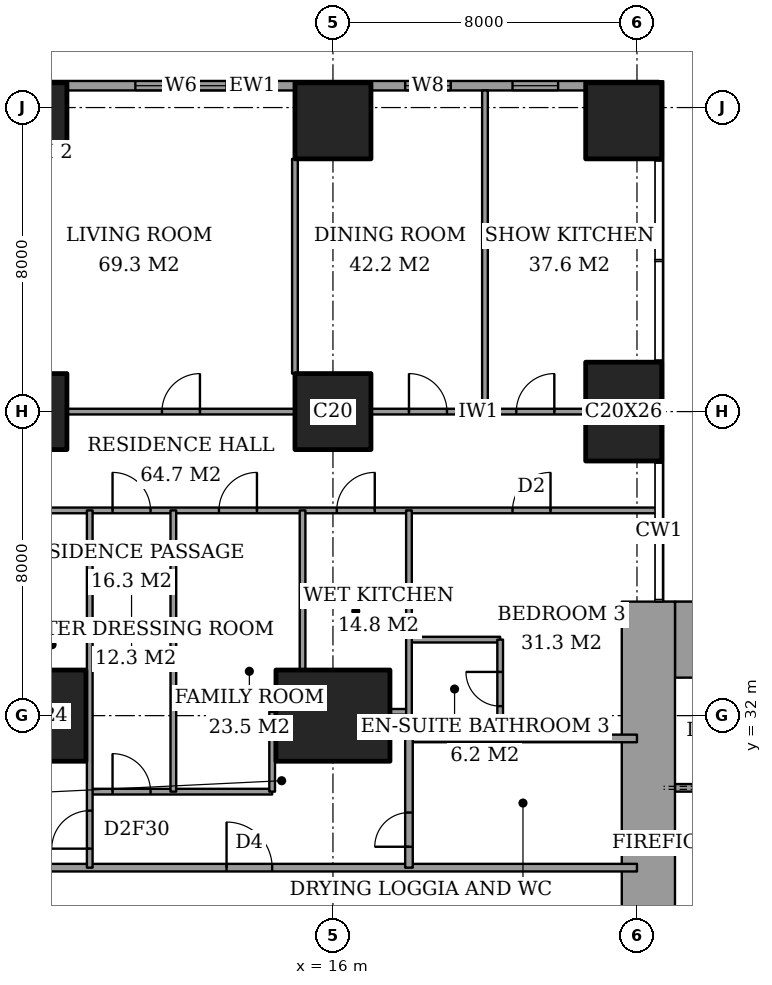
"""IFC4 building model, lengths in metres.
Left out: names, types, materials, properties, quantities, classifications, styles, units other than length and angle.
Written with IfcOpenShell. Run it as: python <this file> out.ifc"""

import sys

from ifc_helpers import new_model, si_unit, direction, frame, frame_2d, origin, origin_2d, place, context, subcontext, project, spatial, rectangle, extrude, element, fill, save


model = new_model("IFC4")
c1 = context("Model", 3, precision=1e-05, world=origin(), true_north=direction((0.0, 1.0)))
c2 = subcontext(c1, "Body", "Model", "MODEL_VIEW")
j1 = project(units=[si_unit("LENGTHUNIT", "METRE"), si_unit("PLANEANGLEUNIT", "RADIAN")], contexts=[c1])
p1 = place(None, origin())
s1 = spatial("IfcSite", under=j1, at=p1, CompositionType="ELEMENT")
p2 = place(p1, origin())
s2 = spatial("IfcBuilding", under=s1, at=p2, CompositionType="ELEMENT")
p3 = place(p2, frame((0.0, 0.0, 72.8)))
s3 = spatial("IfcBuildingStorey", under=s2, at=p3, CompositionType="ELEMENT", Elevation=72.8)
p4 = place(p3, frame((8.0, 32.0, 0.0), z_axis=(0.0, 0.0, 1.0), x_axis=(1.0, 0.0, 0.0)))
e1 = element("IfcColumn", 1, at=p4, inside=s3, PredefinedType="COLUMN", context=c2, shape_type="SweptSolid", body=[
    extrude(rectangle(XDim=3.0, YDim=2.4, at=origin_2d()), origin(), (0.0, 0.0, 1.0), 3.6),
])
for number, where, z_axis, x_axis in (
    (2, (8.0, 40.0, 0.0), (0.0, 0.0, 1.0), (1.0, 0.0, 0.0)),
    (3, (8.0, 47.65, 0.0), (0.0, 0.0, 1.0), (1.0, 0.0, 0.0)),
):
    element("IfcColumn", number, at=place(p3, frame(where, z_axis=z_axis, x_axis=x_axis)), inside=s3, PredefinedType="COLUMN", context=c2, shape_type="SweptSolid", body=[
        extrude(rectangle(XDim=2.0, YDim=2.0, at=origin_2d()), origin(), (0.0, 0.0, 1.0), 3.6),
    ])
p5 = place(p3, frame((16.0, 32.0, 0.0), z_axis=(0.0, 0.0, 1.0), x_axis=(1.0, 0.0, 0.0)))
e4 = element("IfcColumn", 4, at=p5, inside=s3, PredefinedType="COLUMN", context=c2, shape_type="SweptSolid", body=[
    extrude(rectangle(XDim=3.0, YDim=2.4, at=origin_2d()), origin(), (0.0, 0.0, 1.0), 3.6),
])
for number, where, z_axis, x_axis in (
    (5, (16.0, 40.0, 0.0), (0.0, 0.0, 1.0), (1.0, 0.0, 0.0)),
    (6, (16.0, 47.65, 0.0), (0.0, 0.0, 1.0), (1.0, 0.0, 0.0)),
):
    element("IfcColumn", number, at=place(p3, frame(where, z_axis=z_axis, x_axis=x_axis)), inside=s3, PredefinedType="COLUMN", context=c2, shape_type="SweptSolid", body=[
        extrude(rectangle(XDim=2.0, YDim=2.0, at=origin_2d()), origin(), (0.0, 0.0, 1.0), 3.6),
    ])
p6 = place(p3, frame((23.65, 40.0, 0.0), z_axis=(0.0, 0.0, 1.0), x_axis=(1.0, 0.0, 0.0)))
e7 = element("IfcColumn", 7, at=p6, inside=s3, PredefinedType="COLUMN", context=c2, shape_type="SweptSolid", body=[
    extrude(rectangle(XDim=2.0, YDim=2.6, at=origin_2d()), origin(), (0.0, 0.0, 1.0), 3.6),
])
p7 = place(p3, frame((23.65, 47.65, 0.0), z_axis=(0.0, 0.0, 1.0), x_axis=(1.0, 0.0, 0.0)))
e8 = element("IfcColumn", 8, at=p7, inside=s3, PredefinedType="COLUMN", context=c2, shape_type="SweptSolid", body=[
    extrude(rectangle(XDim=2.0, YDim=2.0, at=origin_2d()), origin(), (0.0, 0.0, 1.0), 3.6),
])
p8 = place(p3, frame((25.0, 34.0, 0.0), z_axis=(0.0, 0.0, 1.0), x_axis=(1.0, 0.0, 0.0)))
e9 = element("IfcWall", 9, at=p8, inside=s3, PredefinedType="SHEAR", context=c2, shape_type="SweptSolid", body=[
    extrude(rectangle(XDim=3.15, YDim=2.0, at=frame_2d((1.575, 0.0))), origin(), (0.0, 0.0, 1.0), 3.6),
])
p9 = place(p3, frame((24.3, 23.15, 0.0), z_axis=(0.0, 0.0, 1.0), x_axis=(0.0, 1.0, 0.0)))
e10 = element("IfcWall", 10, at=p9, inside=s3, PredefinedType="SHEAR", context=c2, shape_type="SweptSolid", body=[
    extrude(rectangle(XDim=11.85, YDim=1.4, at=frame_2d((5.925, 0.0))), origin(), (0.0, 0.0, 1.0), 3.6),
])
p10 = place(p9, frame((0.75, 0.0, 0.0)))
e11 = element("IfcOpeningElement", 11, at=p10, cuts=e10, PredefinedType="OPENING", context=c2, shape_type="SweptSolid", body=[
    extrude(rectangle(XDim=1.8, YDim=2.4, at=frame_2d((0.9, 1.2))), frame((0.0, 0.71, 0.0), z_axis=(0.0, -1.0, 0.0), x_axis=(1.0, 0.0, 0.0)), (0.0, 0.0, 1.0), 1.42),
])
p11 = place(p3, frame((24.575, 48.575, 0.0), z_axis=(0.0, 0.0, 1.0), x_axis=(-1.0, 0.0, 0.0)))
e12 = element("IfcWall", 12, at=p11, inside=s3, PredefinedType="SOLIDWALL", context=c2, shape_type="SweptSolid", body=[
    extrude(rectangle(XDim=21.4, YDim=0.25, at=frame_2d((10.7, 0.0))), origin(), (0.0, 0.0, 1.0), 3.6),
])
p12 = place(p11, frame((2.65, 0.0, 0.6)))
e13 = element("IfcOpeningElement", 13, at=p12, cuts=e12, PredefinedType="OPENING", context=c2, shape_type="SweptSolid", body=[
    extrude(rectangle(XDim=1.2, YDim=2.0, at=frame_2d((0.6, 1.0))), frame((0.0, 0.135, 0.0), z_axis=(0.0, -1.0, 0.0), x_axis=(1.0, 0.0, 0.0)), (0.0, 0.0, 1.0), 0.27),
])
p13 = place(p11, frame((5.475, 0.0, 0.6)))
e14 = element("IfcOpeningElement", 14, at=p13, cuts=e12, PredefinedType="OPENING", context=c2, shape_type="SweptSolid", body=[
    extrude(rectangle(XDim=1.2, YDim=2.0, at=frame_2d((0.6, 1.0))), frame((0.0, 0.135, 0.0), z_axis=(0.0, -1.0, 0.0), x_axis=(1.0, 0.0, 0.0)), (0.0, 0.0, 1.0), 0.27),
])
p14 = place(p11, frame((11.375, 0.0, 0.6)))
e15 = element("IfcOpeningElement", 15, at=p14, cuts=e12, PredefinedType="OPENING", context=c2, shape_type="SweptSolid", body=[
    extrude(rectangle(XDim=2.4, YDim=2.0, at=frame_2d((1.2, 1.0))), frame((0.0, 0.135, 0.0), z_axis=(0.0, -1.0, 0.0), x_axis=(1.0, 0.0, 0.0)), (0.0, 0.0, 1.0), 0.27),
])
p15 = place(p11, frame((18.1, 0.0, 0.6)))
e16 = element("IfcOpeningElement", 16, at=p15, cuts=e12, PredefinedType="OPENING", context=c2, shape_type="SweptSolid", body=[
    extrude(rectangle(XDim=1.2, YDim=2.0, at=frame_2d((0.6, 1.0))), frame((0.0, 0.135, 0.0), z_axis=(0.0, -1.0, 0.0), x_axis=(1.0, 0.0, 0.0)), (0.0, 0.0, 1.0), 0.27),
])
p16 = place(p11, frame((19.925, 0.0, 0.6)))
e17 = element("IfcOpeningElement", 17, at=p16, cuts=e12, PredefinedType="OPENING", context=c2, shape_type="SweptSolid", body=[
    extrude(rectangle(XDim=1.2, YDim=2.0, at=frame_2d((0.6, 1.0))), frame((0.0, 0.135, 0.0), z_axis=(0.0, -1.0, 0.0), x_axis=(1.0, 0.0, 0.0)), (0.0, 0.0, 1.0), 0.27),
])
p17 = place(p3, frame((6.725, 28.0, 0.0), z_axis=(0.0, 0.0, 1.0), x_axis=(1.0, 0.0, 0.0)))
e18 = element("IfcWall", 18, at=p17, inside=s3, PredefinedType="PARTITIONING", context=c2, shape_type="SweptSolid", body=[
    extrude(rectangle(XDim=17.275, YDim=0.2, at=frame_2d((8.637, 0.0))), origin(), (0.0, 0.0, 1.0), 3.35),
])
p18 = place(p17, frame((6.475, 0.0, 0.0)))
e19 = element("IfcOpeningElement", 19, at=p18, cuts=e18, PredefinedType="OPENING", context=c2, shape_type="SweptSolid", body=[
    extrude(rectangle(XDim=1.2, YDim=2.4, at=frame_2d((0.6, 1.2))), frame((0.0, 0.11, 0.0), z_axis=(0.0, -1.0, 0.0), x_axis=(1.0, 0.0, 0.0)), (0.0, 0.0, 1.0), 0.22),
])
p19 = place(p3, frame((9.6, 30.0, 0.0), z_axis=(0.0, 0.0, 1.0), x_axis=(1.0, 0.0, 0.0)))
e20 = element("IfcWall", 20, at=p19, inside=s3, PredefinedType="PARTITIONING", context=c2, shape_type="SweptSolid", body=[
    extrude(rectangle(XDim=4.8, YDim=0.15, at=frame_2d((2.4, 0.0))), origin(), (0.0, 0.0, 1.0), 3.35),
])
p20 = place(p19, frame((0.6, 0.0, 0.0)))
e21 = element("IfcOpeningElement", 21, at=p20, cuts=e20, PredefinedType="OPENING", context=c2, shape_type="SweptSolid", body=[
    extrude(rectangle(XDim=1.0, YDim=2.1, at=frame_2d((0.5, 1.05))), frame((0.0, 0.085, 0.0), z_axis=(0.0, -1.0, 0.0), x_axis=(1.0, 0.0, 0.0)), (0.0, 0.0, 1.0), 0.17),
])
p21 = place(p3, frame((18.0, 31.4, 0.0), z_axis=(0.0, 0.0, 1.0), x_axis=(1.0, 0.0, 0.0)))
e22 = element("IfcWall", 22, at=p21, inside=s3, PredefinedType="PARTITIONING", context=c2, shape_type="SweptSolid", body=[
    extrude(rectangle(XDim=6.0, YDim=0.2, at=frame_2d((3.0, 0.0))), origin(), (0.0, 0.0, 1.0), 3.35),
])
p22 = place(p3, frame((17.5, 32.1, 0.0), z_axis=(0.0, 0.0, 1.0), x_axis=(1.0, 0.0, 0.0)))
e23 = element("IfcWall", 23, at=p22, inside=s3, PredefinedType="PARTITIONING", context=c2, shape_type="SweptSolid", body=[
    extrude(rectangle(XDim=0.5, YDim=0.15, at=frame_2d((0.25, 0.0))), origin(), (0.0, 0.0, 1.0), 2.634),
])
p23 = place(p3, frame((18.0, 34.0, 0.0), z_axis=(0.0, 0.0, 1.0), x_axis=(1.0, 0.0, 0.0)))
e24 = element("IfcWall", 24, at=p23, inside=s3, PredefinedType="PARTITIONING", context=c2, shape_type="SweptSolid", body=[
    extrude(rectangle(XDim=2.4, YDim=0.15, at=frame_2d((1.2, 0.0))), origin(), (0.0, 0.0, 1.0), 3.35),
])
p24 = place(p3, frame((-0.45, 37.4, 0.0), z_axis=(0.0, 0.0, 1.0), x_axis=(1.0, 0.0, 0.0)))
e25 = element("IfcWall", 25, at=p24, inside=s3, PredefinedType="PARTITIONING", context=c2, shape_type="SweptSolid", body=[
    extrude(rectangle(XDim=25.011, YDim=0.15, at=frame_2d((12.505, 0.0))), origin(), (0.0, 0.0, 1.0), 3.35),
])
p25 = place(p24, frame((10.65, 0.0, 0.0)))
e26 = element("IfcOpeningElement", 26, at=p25, cuts=e25, PredefinedType="OPENING", context=c2, shape_type="SweptSolid", body=[
    extrude(rectangle(XDim=1.0, YDim=2.1, at=frame_2d((0.5, 1.05))), frame((0.0, 0.085, 0.0), z_axis=(0.0, -1.0, 0.0), x_axis=(1.0, 0.0, 0.0)), (0.0, 0.0, 1.0), 0.17),
])
p26 = place(p24, frame((3.087, 0.0, 0.0)))
e27 = element("IfcOpeningElement", 27, at=p26, cuts=e25, PredefinedType="OPENING", context=c2, shape_type="SweptSolid", body=[
    extrude(rectangle(XDim=1.0, YDim=2.1, at=frame_2d((0.5, 1.05))), frame((0.0, 0.085, 0.0), z_axis=(0.0, -1.0, 0.0), x_axis=(1.0, 0.0, 0.0)), (0.0, 0.0, 1.0), 0.17),
])
p27 = place(p24, frame((13.45, 0.0, 0.0)))
e28 = element("IfcOpeningElement", 28, at=p27, cuts=e25, PredefinedType="OPENING", context=c2, shape_type="SweptSolid", body=[
    extrude(rectangle(XDim=1.0, YDim=2.1, at=frame_2d((0.5, 1.05))), frame((0.0, 0.085, 0.0), z_axis=(0.0, -1.0, 0.0), x_axis=(1.0, 0.0, 0.0)), (0.0, 0.0, 1.0), 0.17),
])
p28 = place(p24, frame((16.55, 0.0, 0.0)))
e29 = element("IfcOpeningElement", 29, at=p28, cuts=e25, PredefinedType="OPENING", context=c2, shape_type="SweptSolid", body=[
    extrude(rectangle(XDim=1.0, YDim=2.1, at=frame_2d((0.5, 1.05))), frame((0.0, 0.085, 0.0), z_axis=(0.0, -1.0, 0.0), x_axis=(1.0, 0.0, 0.0)), (0.0, 0.0, 1.0), 0.17),
])
p29 = place(p24, frame((21.175, 0.0, 0.0)))
e30 = element("IfcOpeningElement", 30, at=p29, cuts=e25, PredefinedType="OPENING", context=c2, shape_type="SweptSolid", body=[
    extrude(rectangle(XDim=1.0, YDim=2.1, at=frame_2d((0.5, 1.05))), frame((0.0, 0.085, 0.0), z_axis=(0.0, -1.0, 0.0), x_axis=(1.0, 0.0, 0.0)), (0.0, 0.0, 1.0), 0.17),
])
p30 = place(p3, frame((9.0, 40.0, 0.0), z_axis=(0.0, 0.0, 1.0), x_axis=(1.0, 0.0, 0.0)))
e31 = element("IfcWall", 31, at=p30, inside=s3, PredefinedType="PARTITIONING", context=c2, shape_type="SweptSolid", body=[
    extrude(rectangle(XDim=6.0, YDim=0.15, at=frame_2d((3.0, 0.0))), origin(), (0.0, 0.0, 1.0), 3.35),
])
p31 = place(p30, frame((2.5, 0.0, 0.0)))
e32 = element("IfcOpeningElement", 32, at=p31, cuts=e31, PredefinedType="OPENING", context=c2, shape_type="SweptSolid", body=[
    extrude(rectangle(XDim=1.0, YDim=2.1, at=frame_2d((0.5, 1.05))), frame((0.0, 0.085, 0.0), z_axis=(0.0, -1.0, 0.0), x_axis=(1.0, 0.0, 0.0)), (0.0, 0.0, 1.0), 0.17),
])
p32 = place(p3, frame((17.0, 40.0, 0.0), z_axis=(0.0, 0.0, 1.0), x_axis=(1.0, 0.0, 0.0)))
e33 = element("IfcWall", 33, at=p32, inside=s3, PredefinedType="PARTITIONING", context=c2, shape_type="SweptSolid", body=[
    extrude(rectangle(XDim=5.65, YDim=0.15, at=frame_2d((2.825, 0.0))), origin(), (0.0, 0.0, 1.0), 3.35),
])
p33 = place(p32, frame((1.0, 0.0, 0.0)))
e34 = element("IfcOpeningElement", 34, at=p33, cuts=e33, PredefinedType="OPENING", context=c2, shape_type="SweptSolid", body=[
    extrude(rectangle(XDim=1.0, YDim=2.1, at=frame_2d((0.5, 1.05))), frame((0.0, 0.085, 0.0), z_axis=(0.0, -1.0, 0.0), x_axis=(1.0, 0.0, 0.0)), (0.0, 0.0, 1.0), 0.17),
])
p34 = place(p32, frame((3.825, 0.0, 0.0)))
e35 = element("IfcOpeningElement", 35, at=p34, cuts=e33, PredefinedType="OPENING", context=c2, shape_type="SweptSolid", body=[
    extrude(rectangle(XDim=1.0, YDim=2.1, at=frame_2d((0.5, 1.05))), frame((0.0, 0.085, 0.0), z_axis=(0.0, -1.0, 0.0), x_axis=(1.0, 0.0, 0.0)), (0.0, 0.0, 1.0), 0.17),
])
p35 = place(p3, frame((9.6, 28.0, 0.0), z_axis=(0.0, 0.0, 1.0), x_axis=(0.0, 1.0, 0.0)))
e36 = element("IfcWall", 36, at=p35, inside=s3, PredefinedType="PARTITIONING", context=c2, shape_type="SweptSolid", body=[
    extrude(rectangle(XDim=9.4, YDim=0.15, at=frame_2d((4.7, 0.0))), origin(), (0.0, 0.0, 1.0), 3.35),
])
p36 = place(p35, frame((0.5, 0.0, 0.0)))
e37 = element("IfcOpeningElement", 37, at=p36, cuts=e36, PredefinedType="OPENING", context=c2, shape_type="SweptSolid", body=[
    extrude(rectangle(XDim=1.0, YDim=2.1, at=frame_2d((0.5, 1.05))), frame((0.0, 0.085, 0.0), z_axis=(0.0, -1.0, 0.0), x_axis=(1.0, 0.0, 0.0)), (0.0, 0.0, 1.0), 0.17),
])
p37 = place(p3, frame((11.8, 30.0, 0.0), z_axis=(0.0, 0.0, 1.0), x_axis=(0.0, 1.0, 0.0)))
e38 = element("IfcWall", 38, at=p37, inside=s3, PredefinedType="PARTITIONING", context=c2, shape_type="SweptSolid", body=[
    extrude(rectangle(XDim=7.4, YDim=0.15, at=frame_2d((3.7, 0.0))), origin(), (0.0, 0.0, 1.0), 3.35),
])
p38 = place(p3, frame((14.4, 30.0, 0.0), z_axis=(0.0, 0.0, 1.0), x_axis=(0.0, 1.0, 0.0)))
e39 = element("IfcWall", 39, at=p38, inside=s3, PredefinedType="PARTITIONING", context=c2, shape_type="SweptSolid", body=[
    extrude(rectangle(XDim=2.1, YDim=0.15, at=frame_2d((1.05, 0.0))), origin(), (0.0, 0.0, 1.0), 3.35),
])
p39 = place(p3, frame((15.0, 41.0, 0.0), z_axis=(0.0, 0.0, 1.0), x_axis=(0.0, 1.0, 0.0)))
e40 = element("IfcWall", 40, at=p39, inside=s3, PredefinedType="PARTITIONING", context=c2, shape_type="SweptSolid", body=[
    extrude(rectangle(XDim=5.65, YDim=0.15, at=frame_2d((2.825, 0.0))), origin(), (0.0, 0.0, 1.0), 3.35),
])
p40 = place(p3, frame((15.2, 33.2, 0.0), z_axis=(0.0, 0.0, 1.0), x_axis=(0.0, 1.0, 0.0)))
e41 = element("IfcWall", 41, at=p40, inside=s3, PredefinedType="PARTITIONING", context=c2, shape_type="SweptSolid", body=[
    extrude(rectangle(XDim=4.2, YDim=0.15, at=frame_2d((2.1, 0.0))), origin(), (0.0, 0.0, 1.0), 3.35),
])
p41 = place(p3, frame((18.0, 28.0, 0.0), z_axis=(0.0, 0.0, 1.0), x_axis=(0.0, 1.0, 0.0)))
e42 = element("IfcWall", 42, at=p41, inside=s3, PredefinedType="PARTITIONING", context=c2, shape_type="SweptSolid", body=[
    extrude(rectangle(XDim=3.4, YDim=0.2, at=frame_2d((1.7, 0.0))), origin(), (0.0, 0.0, 1.0), 3.35),
])
p42 = place(p41, frame((0.55, 0.0, 0.0)))
e43 = element("IfcOpeningElement", 43, at=p42, cuts=e42, PredefinedType="OPENING", context=c2, shape_type="SweptSolid", body=[
    extrude(rectangle(XDim=0.9, YDim=2.1, at=frame_2d((0.45, 1.05))), frame((0.0, 0.11, 0.0), z_axis=(0.0, -1.0, 0.0), x_axis=(1.0, 0.0, 0.0)), (0.0, 0.0, 1.0), 0.22),
])
p43 = place(p3, frame((18.0, 31.4, 0.0), z_axis=(0.0, 0.0, 1.0), x_axis=(0.0, 1.0, 0.0)))
e44 = element("IfcWall", 44, at=p43, inside=s3, PredefinedType="PARTITIONING", context=c2, shape_type="SweptSolid", body=[
    extrude(rectangle(XDim=6.0, YDim=0.15, at=frame_2d((3.0, 0.0))), origin(), (0.0, 0.0, 1.0), 3.35),
])
p44 = place(p3, frame((20.0, 40.0, 0.0), z_axis=(0.0, 0.0, 1.0), x_axis=(0.0, 1.0, 0.0)))
e45 = element("IfcWall", 45, at=p44, inside=s3, PredefinedType="PARTITIONING", context=c2, shape_type="SweptSolid", body=[
    extrude(rectangle(XDim=8.45, YDim=0.15, at=frame_2d((4.225, 0.0))), origin(), (0.0, 0.0, 1.0), 3.35),
])
p45 = place(p3, frame((20.4, 31.4, 0.0), z_axis=(0.0, 0.0, 1.0), x_axis=(0.0, 1.0, 0.0)))
e46 = element("IfcWall", 46, at=p45, inside=s3, PredefinedType="PARTITIONING", context=c2, shape_type="SweptSolid", body=[
    extrude(rectangle(XDim=2.6, YDim=0.15, at=frame_2d((1.3, 0.0))), origin(), (0.0, 0.0, 1.0), 3.35),
])
p46 = place(p45, frame((0.85, 0.0, 0.0)))
e47 = element("IfcOpeningElement", 47, at=p46, cuts=e46, PredefinedType="OPENING", context=c2, shape_type="SweptSolid", body=[
    extrude(rectangle(XDim=0.9, YDim=2.1, at=frame_2d((0.45, 1.05))), frame((0.0, 0.085, 0.0), z_axis=(0.0, -1.0, 0.0), x_axis=(1.0, 0.0, 0.0)), (0.0, 0.0, 1.0), 0.17),
])
p47 = place(p3, frame((25.0, 30.1, 0.0), z_axis=(0.0, 0.0, 1.0), x_axis=(1.0, 0.0, 0.0)))
e48 = element("IfcWall", 48, at=p47, inside=s3, PredefinedType="PARTITIONING", context=c2, shape_type="SweptSolid", body=[
    extrude(rectangle(XDim=12.7, YDim=0.2, at=frame_2d((6.35, 0.0))), origin(), (0.0, 0.0, 1.0), 3.6),
])
p48 = place(p47, frame((0.9, 0.0, 0.0)))
e49 = element("IfcOpeningElement", 49, at=p48, cuts=e48, PredefinedType="OPENING", context=c2, shape_type="SweptSolid", body=[
    extrude(rectangle(XDim=1.2, YDim=2.1, at=frame_2d((0.6, 1.05))), frame((0.0, 0.11, 0.0), z_axis=(0.0, -1.0, 0.0), x_axis=(1.0, 0.0, 0.0)), (0.0, 0.0, 1.0), 0.22),
])
p49 = place(p12, origin())
e50 = element("IfcWindow", 50, at=p49, inside=s3, PartitioningType="SINGLE_PANEL", PredefinedType="WINDOW", context=c2, shape_type="SweptSolid", body=[
    extrude(rectangle(XDim=1.2, YDim=2.0, at=frame_2d((0.6, 1.0))), frame((0.0, 0.03, 0.0), z_axis=(0.0, -1.0, 0.0), x_axis=(1.0, 0.0, 0.0)), (0.0, 0.0, 1.0), 0.06),
])
fill(e13, e50)
p50 = place(p13, origin())
e51 = element("IfcWindow", 51, at=p50, inside=s3, PartitioningType="SINGLE_PANEL", PredefinedType="WINDOW", context=c2, shape_type="SweptSolid", body=[
    extrude(rectangle(XDim=1.2, YDim=2.0, at=frame_2d((0.6, 1.0))), frame((0.0, 0.03, 0.0), z_axis=(0.0, -1.0, 0.0), x_axis=(1.0, 0.0, 0.0)), (0.0, 0.0, 1.0), 0.06),
])
fill(e14, e51)
p51 = place(p14, origin())
e52 = element("IfcWindow", 52, at=p51, inside=s3, PartitioningType="SINGLE_PANEL", PredefinedType="WINDOW", context=c2, shape_type="SweptSolid", body=[
    extrude(rectangle(XDim=2.4, YDim=2.0, at=frame_2d((1.2, 1.0))), frame((0.0, 0.03, 0.0), z_axis=(0.0, -1.0, 0.0), x_axis=(1.0, 0.0, 0.0)), (0.0, 0.0, 1.0), 0.06),
])
fill(e15, e52)
p52 = place(p31, origin())
e53 = element("IfcDoor", 53, at=p52, inside=s3, OperationType="SINGLE_SWING_LEFT", PredefinedType="DOOR", context=c2, shape_type="SweptSolid", body=[
    extrude(rectangle(XDim=1.0, YDim=2.1, at=frame_2d((0.5, 1.05))), frame((0.0, 0.025, 0.0), z_axis=(0.0, -1.0, 0.0), x_axis=(1.0, 0.0, 0.0)), (0.0, 0.0, 1.0), 0.05),
])
fill(e32, e53)
p53 = place(p33, origin())
e54 = element("IfcDoor", 54, at=p53, inside=s3, OperationType="SINGLE_SWING_RIGHT", PredefinedType="DOOR", context=c2, shape_type="SweptSolid", body=[
    extrude(rectangle(XDim=1.0, YDim=2.1, at=frame_2d((0.5, 1.05))), frame((0.0, 0.025, 0.0), z_axis=(0.0, -1.0, 0.0), x_axis=(1.0, 0.0, 0.0)), (0.0, 0.0, 1.0), 0.05),
])
fill(e34, e54)
p54 = place(p34, origin())
e55 = element("IfcDoor", 55, at=p54, inside=s3, OperationType="SINGLE_SWING_LEFT", PredefinedType="DOOR", context=c2, shape_type="SweptSolid", body=[
    extrude(rectangle(XDim=1.0, YDim=2.1, at=frame_2d((0.5, 1.05))), frame((0.0, 0.025, 0.0), z_axis=(0.0, -1.0, 0.0), x_axis=(1.0, 0.0, 0.0)), (0.0, 0.0, 1.0), 0.05),
])
fill(e35, e55)
p55 = place(p25, origin())
e56 = element("IfcDoor", 56, at=p55, inside=s3, OperationType="SINGLE_SWING_RIGHT", PredefinedType="DOOR", context=c2, shape_type="SweptSolid", body=[
    extrude(rectangle(XDim=1.0, YDim=2.1, at=frame_2d((0.5, 1.05))), frame((0.0, 0.025, 0.0), z_axis=(0.0, -1.0, 0.0), x_axis=(1.0, 0.0, 0.0)), (0.0, 0.0, 1.0), 0.05),
])
fill(e26, e56)
p56 = place(p36, origin())
e57 = element("IfcDoor", 57, at=p56, inside=s3, OperationType="SINGLE_SWING_RIGHT", PredefinedType="DOOR", context=c2, shape_type="SweptSolid", body=[
    extrude(rectangle(XDim=1.0, YDim=2.1, at=frame_2d((0.5, 1.05))), frame((0.0, 0.025, 0.0), z_axis=(0.0, -1.0, 0.0), x_axis=(1.0, 0.0, 0.0)), (0.0, 0.0, 1.0), 0.05),
])
fill(e37, e57)
p57 = place(p18, origin())
e58 = element("IfcDoor", 58, at=p57, inside=s3, OperationType="SINGLE_SWING_RIGHT", PredefinedType="DOOR", context=c2, shape_type="SweptSolid", body=[
    extrude(rectangle(XDim=1.2, YDim=2.4, at=frame_2d((0.6, 1.2))), frame((0.0, 0.025, 0.0), z_axis=(0.0, -1.0, 0.0), x_axis=(1.0, 0.0, 0.0)), (0.0, 0.0, 1.0), 0.05),
])
fill(e19, e58)
p58 = place(p20, origin())
e59 = element("IfcDoor", 59, at=p58, inside=s3, OperationType="SINGLE_SWING_RIGHT", PredefinedType="DOOR", context=c2, shape_type="SweptSolid", body=[
    extrude(rectangle(XDim=1.0, YDim=2.1, at=frame_2d((0.5, 1.05))), frame((0.0, 0.025, 0.0), z_axis=(0.0, -1.0, 0.0), x_axis=(1.0, 0.0, 0.0)), (0.0, 0.0, 1.0), 0.05),
])
fill(e21, e59)
p59 = place(p27, origin())
e60 = element("IfcDoor", 60, at=p59, inside=s3, OperationType="SINGLE_SWING_LEFT", PredefinedType="DOOR", context=c2, shape_type="SweptSolid", body=[
    extrude(rectangle(XDim=1.0, YDim=2.1, at=frame_2d((0.5, 1.05))), frame((0.0, 0.025, 0.0), z_axis=(0.0, -1.0, 0.0), x_axis=(1.0, 0.0, 0.0)), (0.0, 0.0, 1.0), 0.05),
])
fill(e28, e60)
p60 = place(p28, origin())
e61 = element("IfcDoor", 61, at=p60, inside=s3, OperationType="SINGLE_SWING_LEFT", PredefinedType="DOOR", context=c2, shape_type="SweptSolid", body=[
    extrude(rectangle(XDim=1.0, YDim=2.1, at=frame_2d((0.5, 1.05))), frame((0.0, 0.025, 0.0), z_axis=(0.0, -1.0, 0.0), x_axis=(1.0, 0.0, 0.0)), (0.0, 0.0, 1.0), 0.05),
])
fill(e29, e61)
p61 = place(p46, origin())
e62 = element("IfcDoor", 62, at=p61, inside=s3, OperationType="SINGLE_SWING_LEFT", PredefinedType="DOOR", context=c2, shape_type="SweptSolid", body=[
    extrude(rectangle(XDim=0.9, YDim=2.1, at=frame_2d((0.45, 1.05))), frame((0.0, 0.025, 0.0), z_axis=(0.0, -1.0, 0.0), x_axis=(1.0, 0.0, 0.0)), (0.0, 0.0, 1.0), 0.05),
])
fill(e47, e62)
p62 = place(p29, origin())
e63 = element("IfcDoor", 63, at=p62, inside=s3, OperationType="SINGLE_SWING_LEFT", PredefinedType="DOOR", context=c2, shape_type="SweptSolid", body=[
    extrude(rectangle(XDim=1.0, YDim=2.1, at=frame_2d((0.5, 1.05))), frame((0.0, 0.025, 0.0), z_axis=(0.0, -1.0, 0.0), x_axis=(1.0, 0.0, 0.0)), (0.0, 0.0, 1.0), 0.05),
])
fill(e30, e63)
p63 = place(p42, origin())
e64 = element("IfcDoor", 64, at=p63, inside=s3, OperationType="SINGLE_SWING_RIGHT", PredefinedType="DOOR", context=c2, shape_type="SweptSolid", body=[
    extrude(rectangle(XDim=0.9, YDim=2.1, at=frame_2d((0.45, 1.05))), frame((0.0, 0.025, 0.0), z_axis=(0.0, -1.0, 0.0), x_axis=(1.0, 0.0, 0.0)), (0.0, 0.0, 1.0), 0.05),
])
fill(e43, e64)
save(model, sys.argv[1])
